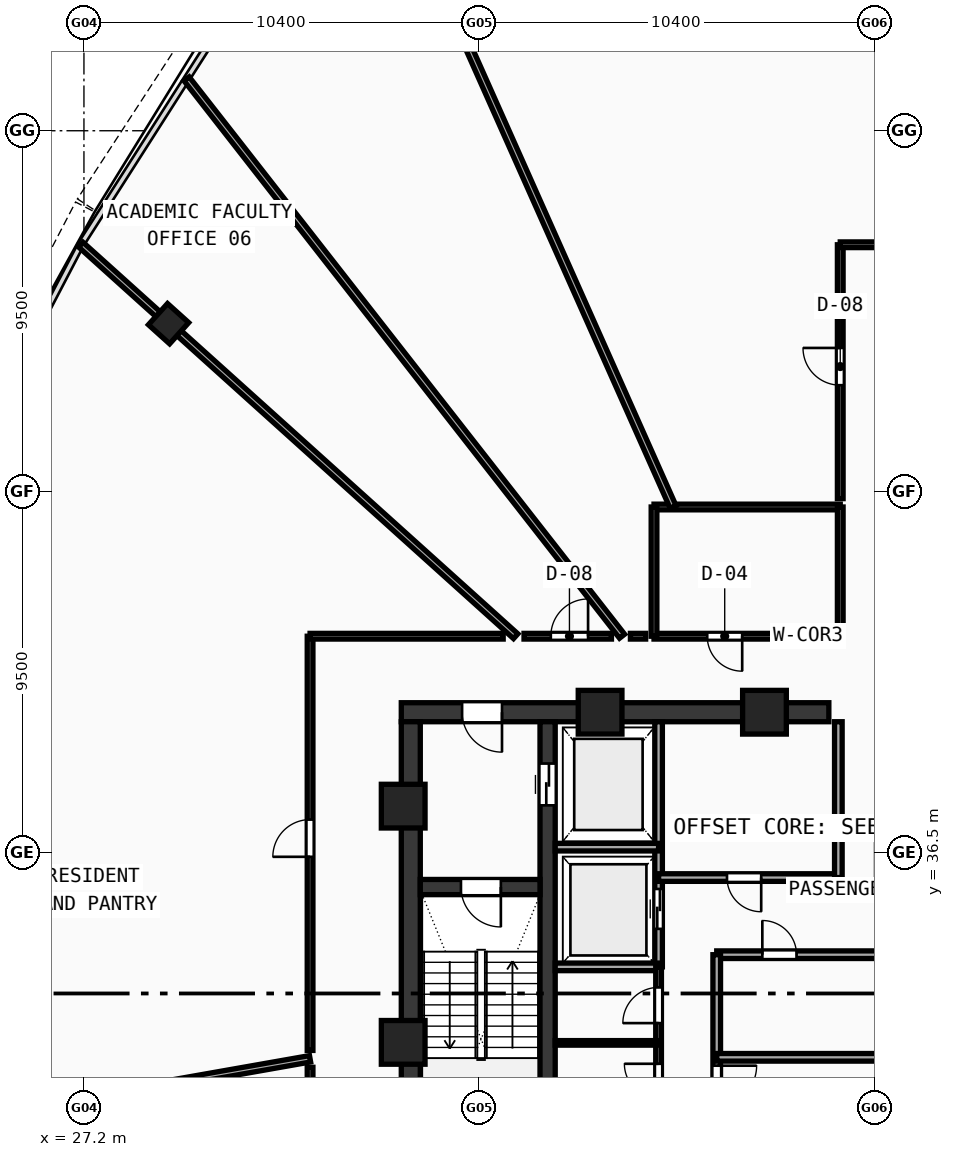
"""IFC4 building model, lengths in metres.
Left out: names, types, materials, properties, quantities, classifications, styles, units other than length and angle.
Written with IfcOpenShell. Run it as: python <this file> out.ifc"""

import sys

from ifc_helpers import new_model, si_unit, direction, frame, frame_2d, origin, origin_with_axes, origin_2d, place, context, subcontext, project, spatial, rectangle, hollow_rectangle, extrude, source, transform, mapped, element, fill, save


model = new_model("IFC4")
c1 = context("Model", 3, precision=1e-05, world=origin(), true_north=direction((0.0, 1.0)))
c2 = subcontext(c1, "Body", "Model", "MODEL_VIEW")
j1 = project(units=[si_unit("LENGTHUNIT", "METRE"), si_unit("PLANEANGLEUNIT", "RADIAN")], contexts=[c1])
p1 = place(None, origin())
s1 = spatial("IfcSite", under=j1, at=p1, CompositionType="ELEMENT")
p2 = place(p1, origin())
s2 = spatial("IfcBuilding", under=s1, at=p2, CompositionType="ELEMENT")
p3 = place(p2, frame((0.0, 0.0, 277.56)))
s3 = spatial("IfcBuildingStorey", under=s2, at=p3, CompositionType="ELEMENT", Elevation=277.56)
p4 = place(p3, frame((35.55, 40.2, 0.0), z_axis=(0.0, 0.0, 1.0), x_axis=(1.0, 0.0, 0.0)))
e1 = element("IfcWall", 1, at=p4, inside=s3, PredefinedType="SHEAR", context=c2, shape_type="SweptSolid", body=[
    extrude(rectangle(XDim=11.25, YDim=0.5, at=frame_2d((5.625, 0.0))), origin(), (0.0, 0.0, 1.0), 3.47),
])
p5 = place(p4, frame((1.6, 0.0, 0.0)))
e2 = element("IfcOpeningElement", 2, at=p5, cuts=e1, PredefinedType="OPENING", context=c2, shape_type="SweptSolid", body=[
    extrude(rectangle(XDim=1.05, YDim=2.1, at=frame_2d((0.525, 1.05))), frame((0.0, 0.26, 0.0), z_axis=(0.0, -1.0, 0.0), x_axis=(1.0, 0.0, 0.0)), (0.0, 0.0, 1.0), 0.52),
])
p6 = place(p3, frame((35.8, 27.75, 0.0), z_axis=(0.0, 0.0, 1.0), x_axis=(0.0, 1.0, 0.0)))
e3 = element("IfcWall", 3, at=p6, inside=s3, PredefinedType="SHEAR", context=c2, shape_type="SweptSolid", body=[
    extrude(rectangle(XDim=12.2, YDim=0.5, at=frame_2d((6.1, 0.0))), origin(), (0.0, 0.0, 1.0), 3.47),
])
p7 = place(p3, frame((39.4, 27.75, 0.0), z_axis=(0.0, 0.0, 1.0), x_axis=(0.0, 1.0, 0.0)))
e4 = element("IfcWall", 4, at=p7, inside=s3, PredefinedType="SHEAR", context=c2, shape_type="SweptSolid", body=[
    extrude(rectangle(XDim=12.2, YDim=0.4, at=frame_2d((6.1, 0.0))), origin(), (0.0, 0.0, 1.0), 3.47),
])
p8 = place(p7, frame((10.0, 0.0, 0.0)))
e5 = element("IfcOpeningElement", 5, at=p8, cuts=e4, PredefinedType="OPENING", context=c2, shape_type="SweptSolid", body=[
    extrude(rectangle(XDim=1.1, YDim=2.1, at=frame_2d((0.55, 1.05))), frame((0.0, 0.21, 0.0), z_axis=(0.0, -1.0, 0.0), x_axis=(1.0, 0.0, 0.0)), (0.0, 0.0, 1.0), 0.42),
])
p9 = place(p3, frame((36.05, 35.6, 0.0), z_axis=(0.0, 0.0, 1.0), x_axis=(1.0, 0.0, 0.0)))
e6 = element("IfcWall", 6, at=p9, inside=s3, PredefinedType="SHEAR", context=c2, shape_type="SweptSolid", body=[
    extrude(rectangle(XDim=3.15, YDim=0.4, at=frame_2d((1.575, 0.0))), origin(), (0.0, 0.0, 1.0), 3.47),
])
p10 = place(p9, frame((1.07, 0.0, 0.0)))
e7 = element("IfcOpeningElement", 7, at=p10, cuts=e6, PredefinedType="OPENING", context=c2, shape_type="SweptSolid", body=[
    extrude(rectangle(XDim=1.05, YDim=2.1, at=frame_2d((0.525, 1.05))), frame((0.0, 0.21, 0.0), z_axis=(0.0, -1.0, 0.0), x_axis=(1.0, 0.0, 0.0)), (0.0, 0.0, 1.0), 0.42),
])
m1 = source(origin(), c2, "Body", "SweptSolid", [
    extrude(hollow_rectangle(XDim=1.15, YDim=1.15, WallThickness=0.048, at=origin_2d()), origin(), (0.0, 0.0, 1.0), 3.73),
])
for number, where, z_axis, x_axis in (
    (8, (45.106, 40.2, -0.26), (0.0, 0.0, 1.0), (1.0, 0.0, 0.0)),
    (9, (40.781, 40.2, -0.26), (0.0, 0.0, 1.0), (1.0, 0.0, 0.0)),
    (10, (35.6, 37.729, -0.26), (0.0, 0.0, 1.0), (1.0, 0.0, 0.0)),
    (11, (35.6, 31.513, -0.26), (0.0, 0.0, 1.0), (1.0, 0.0, 0.0)),
):
    element("IfcColumn", number, at=place(p3, frame(where, z_axis=z_axis, x_axis=x_axis)), inside=s3, PredefinedType="COLUMN", context=c2, shape_type="MappedRepresentation", body=[
        mapped(m1, transform((0.0, 0.0, 0.0), scale=1.0)),
    ])
m2 = source(origin(), c2, "Body", "SweptSolid", [
    extrude(hollow_rectangle(XDim=0.75, YDim=0.75, WallThickness=0.028, at=origin_2d()), origin(), (0.0, 0.0, 1.0), 3.73),
])
p11 = place(p3, frame((29.427, 50.424, -0.26), z_axis=(0.0, 0.0, 1.0), x_axis=(-0.669130606359, -0.743144825477, 0.0)))
e12 = element("IfcColumn", 12, at=p11, inside=s3, PredefinedType="COLUMN", context=c2, shape_type="MappedRepresentation", body=[
    mapped(m2, transform((0.0, 0.0, 0.0), scale=1.0)),
])
p12 = place(p3, frame((42.32, 33.5, 0.0), z_axis=(0.0, 0.0, 1.0), x_axis=(0.0, 1.0, 0.0)))
e13 = element("IfcWall", 13, at=p12, inside=s3, PredefinedType="SOLIDWALL", context=c2, shape_type="SweptSolid", body=[
    extrude(rectangle(XDim=6.45, YDim=0.2, at=frame_2d((3.225, 0.0))), origin(), (0.0, 0.0, 1.0), 3.47),
])
p13 = place(p12, frame((1.0, 0.0, 0.0)))
e14 = element("IfcOpeningElement", 14, at=p13, cuts=e13, PredefinedType="OPENING", context=c2, shape_type="SweptSolid", body=[
    extrude(rectangle(XDim=1.05, YDim=2.1, at=frame_2d((0.525, 1.05))), frame((0.0, 0.11, 0.0), z_axis=(0.0, -1.0, 0.0), x_axis=(1.0, 0.0, 0.0)), (0.0, 0.0, 1.0), 0.22),
])
for number, where, z_axis, x_axis in (
    (15, (39.6, 36.65, 0.0), (0.0, 0.0, 1.0), (1.0, 0.0, 0.0)),
    (16, (39.6, 33.5, 0.0), (0.0, 0.0, 1.0), (1.0, 0.0, 0.0)),
):
    element("IfcWall", number, at=place(p3, frame(where, z_axis=z_axis, x_axis=x_axis)), inside=s3, PredefinedType="SOLIDWALL", context=c2, shape_type="SweptSolid", body=[
        extrude(rectangle(XDim=2.72, YDim=0.2, at=frame_2d((1.36, 0.0))), origin(), (0.0, 0.0, 1.0), 3.47),
    ])
p14 = place(p3, frame((42.32, 35.85, 0.0), z_axis=(0.0, 0.0, 1.0), x_axis=(1.0, 0.0, 0.0)))
e17 = element("IfcWall", 17, at=p14, inside=s3, PredefinedType="SOLIDWALL", context=c2, shape_type="SweptSolid", body=[
    extrude(rectangle(XDim=4.73, YDim=0.2, at=frame_2d((2.365, 0.0))), origin(), (0.0, 0.0, 1.0), 3.47),
])
p15 = place(p14, frame((1.8, 0.0, 0.0)))
e18 = element("IfcOpeningElement", 18, at=p15, cuts=e17, PredefinedType="OPENING", context=c2, shape_type="SweptSolid", body=[
    extrude(rectangle(XDim=0.9, YDim=2.1, at=frame_2d((0.45, 1.05))), frame((0.0, 0.11, 0.0), z_axis=(0.0, -1.0, 0.0), x_axis=(1.0, 0.0, 0.0)), (0.0, 0.0, 1.0), 0.22),
])
p16 = place(p3, frame((47.05, 35.85, 0.0), z_axis=(0.0, 0.0, 1.0), x_axis=(0.0, 1.0, 0.0)))
e19 = element("IfcWall", 19, at=p16, inside=s3, PredefinedType="SOLIDWALL", context=c2, shape_type="SweptSolid", body=[
    extrude(rectangle(XDim=4.1, YDim=0.2, at=frame_2d((2.05, 0.0))), origin(), (0.0, 0.0, 1.0), 3.47),
])
p17 = place(p3, frame((43.85, 33.82, 0.0), z_axis=(0.0, 0.0, 1.0), x_axis=(1.0, 0.0, 0.0)))
e20 = element("IfcWall", 20, at=p17, inside=s3, PredefinedType="SOLIDWALL", context=c2, shape_type="SweptSolid", body=[
    extrude(rectangle(XDim=9.83, YDim=0.2, at=frame_2d((4.915, 0.0))), origin(), (0.0, 0.0, 1.0), 3.47),
])
p18 = place(p17, frame((1.2, 0.0, 0.0)))
e21 = element("IfcOpeningElement", 21, at=p18, cuts=e20, PredefinedType="OPENING", context=c2, shape_type="SweptSolid", body=[
    extrude(rectangle(XDim=0.9, YDim=2.1, at=frame_2d((0.45, 1.05))), frame((0.0, 0.11, 0.0), z_axis=(0.0, -1.0, 0.0), x_axis=(1.0, 0.0, 0.0)), (0.0, 0.0, 1.0), 0.22),
])
p19 = place(p17, frame((7.2, 0.0, 0.0)))
e22 = element("IfcOpeningElement", 22, at=p19, cuts=e20, PredefinedType="OPENING", context=c2, shape_type="SweptSolid", body=[
    extrude(rectangle(XDim=0.9, YDim=2.1, at=frame_2d((0.45, 1.05))), frame((0.0, 0.11, 0.0), z_axis=(0.0, -1.0, 0.0), x_axis=(1.0, 0.0, 0.0)), (0.0, 0.0, 1.0), 0.22),
])
p20 = place(p3, frame((43.85, 27.6, 0.0), z_axis=(0.0, 0.0, 1.0), x_axis=(0.0, 1.0, 0.0)))
e23 = element("IfcWall", 23, at=p20, inside=s3, PredefinedType="SOLIDWALL", context=c2, shape_type="SweptSolid", body=[
    extrude(rectangle(XDim=6.22, YDim=0.2, at=frame_2d((3.11, 0.0))), origin(), (0.0, 0.0, 1.0), 3.47),
])
p21 = place(p20, frame((2.25, 0.0, 0.0)))
e24 = element("IfcOpeningElement", 24, at=p21, cuts=e23, PredefinedType="OPENING", context=c2, shape_type="SweptSolid", body=[
    extrude(rectangle(XDim=1.05, YDim=2.1, at=frame_2d((0.525, 1.05))), frame((0.0, 0.11, 0.0), z_axis=(0.0, -1.0, 0.0), x_axis=(1.0, 0.0, 0.0)), (0.0, 0.0, 1.0), 0.22),
])
p22 = place(p3, frame((43.85, 31.12, 0.0), z_axis=(0.0, 0.0, 1.0), x_axis=(1.0, 0.0, 0.0)))
e25 = element("IfcWall", 25, at=p22, inside=s3, PredefinedType="SOLIDWALL", context=c2, shape_type="SweptSolid", body=[
    extrude(rectangle(XDim=9.83, YDim=0.2, at=frame_2d((4.915, 0.0))), origin(), (0.0, 0.0, 1.0), 3.47),
])
p23 = place(p3, frame((42.32, 27.6, 0.0), z_axis=(0.0, 0.0, 1.0), x_axis=(0.0, 1.0, 0.0)))
e26 = element("IfcWall", 26, at=p23, inside=s3, PredefinedType="PARTITIONING", context=c2, shape_type="SweptSolid", body=[
    extrude(rectangle(XDim=5.9, YDim=0.15, at=frame_2d((2.95, 0.0))), origin(), (0.0, 0.0, 1.0), 3.47),
])
p24 = place(p23, frame((0.5, 0.0, 0.0)))
e27 = element("IfcOpeningElement", 27, at=p24, cuts=e26, PredefinedType="OPENING", context=c2, shape_type="SweptSolid", body=[
    extrude(rectangle(XDim=0.9, YDim=2.1, at=frame_2d((0.45, 1.05))), frame((0.0, 0.085, 0.0), z_axis=(0.0, -1.0, 0.0), x_axis=(1.0, 0.0, 0.0)), (0.0, 0.0, 1.0), 0.17),
])
p25 = place(p23, frame((2.45, 0.0, 0.0)))
e28 = element("IfcOpeningElement", 28, at=p25, cuts=e26, PredefinedType="OPENING", context=c2, shape_type="SweptSolid", body=[
    extrude(rectangle(XDim=0.9, YDim=2.1, at=frame_2d((0.45, 1.05))), frame((0.0, 0.085, 0.0), z_axis=(0.0, -1.0, 0.0), x_axis=(1.0, 0.0, 0.0)), (0.0, 0.0, 1.0), 0.17),
])
p26 = place(p23, frame((4.42, 0.0, 0.0)))
e29 = element("IfcOpeningElement", 29, at=p26, cuts=e26, PredefinedType="OPENING", context=c2, shape_type="SweptSolid", body=[
    extrude(rectangle(XDim=0.94, YDim=2.1, at=frame_2d((0.47, 1.05))), frame((0.0, 0.085, 0.0), z_axis=(0.0, -1.0, 0.0), x_axis=(1.0, 0.0, 0.0)), (0.0, 0.0, 1.0), 0.17),
])
p27 = place(p3, frame((39.6, 31.5, 0.0), z_axis=(0.0, 0.0, 1.0), x_axis=(1.0, 0.0, 0.0)))
e30 = element("IfcWall", 30, at=p27, inside=s3, PredefinedType="PARTITIONING", context=c2, shape_type="SweptSolid", body=[
    extrude(rectangle(XDim=2.72, YDim=0.12, at=frame_2d((1.36, 0.0))), origin(), (0.0, 0.0, 1.0), 3.47),
])
p28 = place(p3, frame((42.2, 42.2, 0.0), z_axis=(0.0, 0.0, 1.0), x_axis=(1.0, 0.0, 0.0)))
e31 = element("IfcWall", 31, at=p28, inside=s3, PredefinedType="PARTITIONING", context=c2, shape_type="SweptSolid", body=[
    extrude(rectangle(XDim=4.9, YDim=0.15, at=frame_2d((2.45, 0.0))), origin(), (0.0, 0.0, 1.0), 2.87),
])
p29 = place(p28, frame((1.4, 0.0, 0.0)))
e32 = element("IfcOpeningElement", 32, at=p29, cuts=e31, PredefinedType="OPENING", context=c2, shape_type="SweptSolid", body=[
    extrude(rectangle(XDim=0.92, YDim=2.1, at=frame_2d((0.46, 1.05))), frame((0.0, 0.085, 0.0), z_axis=(0.0, -1.0, 0.0), x_axis=(1.0, 0.0, 0.0)), (0.0, 0.0, 1.0), 0.17),
])
p30 = place(p3, frame((42.2, 45.6, 0.0), z_axis=(0.0, 0.0, 1.0), x_axis=(1.0, 0.0, 0.0)))
e33 = element("IfcWall", 33, at=p30, inside=s3, PredefinedType="PARTITIONING", context=c2, shape_type="SweptSolid", body=[
    extrude(rectangle(XDim=4.9, YDim=0.15, at=frame_2d((2.45, 0.0))), origin(), (0.0, 0.0, 1.0), 2.87),
])
for number, where, z_axis, x_axis in (
    (34, (42.2, 42.2, 0.0), (0.0, 0.0, 1.0), (0.0, 1.0, 0.0)),
    (35, (47.1, 42.2, 0.0), (0.0, 0.0, 1.0), (0.0, 1.0, 0.0)),
):
    element("IfcWall", number, at=place(p3, frame(where, z_axis=z_axis, x_axis=x_axis)), inside=s3, PredefinedType="PARTITIONING", context=c2, shape_type="SweptSolid", body=[
        extrude(rectangle(XDim=3.4, YDim=0.15, at=frame_2d((1.7, 0.0))), origin(), (0.0, 0.0, 1.0), 3.47),
    ])
p31 = place(p3, frame((42.702, 45.6, 0.0), z_axis=(0.0, 0.0, 1.0), x_axis=(-0.406743072482, 0.91354259506, 0.0)))
e36 = element("IfcWall", 36, at=p31, inside=s3, PredefinedType="PARTITIONING", context=c2, shape_type="SweptSolid", body=[
    extrude(rectangle(XDim=20.191, YDim=0.17, at=frame_2d((10.096, 0.0))), origin(), (0.0, 0.0, 1.0), 2.87),
])
p32 = place(p3, frame((41.359, 42.2, 0.0), z_axis=(0.0, 0.0, 1.0), x_axis=(-0.615658553978, 0.788013036005, 0.0)))
e37 = element("IfcWall", 37, at=p32, inside=s3, PredefinedType="PARTITIONING", context=c2, shape_type="SweptSolid", body=[
    extrude(rectangle(XDim=18.609, YDim=0.17, at=frame_2d((9.304, 0.0))), origin(), (0.0, 0.0, 1.0), 2.87),
])
p33 = place(p3, frame((38.56, 42.2, 0.0), z_axis=(0.0, 0.0, 1.0), x_axis=(-0.743145118403, 0.669130281032, 0.0)))
e38 = element("IfcWall", 38, at=p33, inside=s3, PredefinedType="PARTITIONING", context=c2, shape_type="SweptSolid", body=[
    extrude(rectangle(XDim=15.397, YDim=0.17, at=frame_2d((7.699, 0.0))), origin(), (0.0, 0.0, 1.0), 2.87),
])
p34 = place(p3, frame((33.15, 31.082, 0.0), z_axis=(0.0, 0.0, 1.0), x_axis=(-0.984807054696, -0.173652137966, 0.0)))
e39 = element("IfcWall", 39, at=p34, inside=s3, PredefinedType="PARTITIONING", context=c2, shape_type="SweptSolid", body=[
    extrude(rectangle(XDim=17.567, YDim=0.17, at=frame_2d((8.783, 0.0))), origin(), (0.0, 0.0, 1.0), 2.87),
])
p35 = place(p3, frame((33.15, 24.9, 0.0), z_axis=(0.0, 0.0, 1.0), x_axis=(0.0, 1.0, 0.0)))
e40 = element("IfcWall", 40, at=p35, inside=s3, PredefinedType="PARTITIONING", context=c2, shape_type="SweptSolid", body=[
    extrude(rectangle(XDim=5.958, YDim=0.15, at=frame_2d((2.979, 0.0))), origin(), (0.0, 0.0, 1.0), 3.12),
])
p36 = place(p3, frame((33.15, 31.301, 0.0), z_axis=(0.0, 0.0, 1.0), x_axis=(0.0, 1.0, 0.0)))
e41 = element("IfcWall", 41, at=p36, inside=s3, PredefinedType="PARTITIONING", context=c2, shape_type="SweptSolid", body=[
    extrude(rectangle(XDim=10.899, YDim=0.15, at=frame_2d((5.449, 0.0))), origin(), (0.0, 0.0, 1.0), 2.87),
])
p37 = place(p36, frame((5.094, 0.0, 0.0)))
e42 = element("IfcOpeningElement", 42, at=p37, cuts=e41, PredefinedType="OPENING", context=c2, shape_type="SweptSolid", body=[
    extrude(rectangle(XDim=0.98, YDim=2.12, at=frame_2d((0.49, 1.06))), frame((0.0, 0.085, 0.0), z_axis=(0.0, -1.0, 0.0), x_axis=(1.0, 0.0, 0.0)), (0.0, 0.0, 1.0), 0.17),
])
p38 = place(p3, frame((33.15, 42.2, 0.0), z_axis=(0.0, 0.0, 1.0), x_axis=(1.0, 0.0, 0.0)))
e43 = element("IfcWall", 43, at=p38, inside=s3, PredefinedType="PARTITIONING", context=c2, shape_type="SweptSolid", body=[
    extrude(rectangle(XDim=5.081, YDim=0.15, at=frame_2d((2.541, 0.0))), origin(), (0.0, 0.0, 1.0), 3.12),
])
p39 = place(p3, frame((38.78, 42.2, 0.0), z_axis=(0.0, 0.0, 1.0), x_axis=(1.0, 0.0, 0.0)))
e44 = element("IfcWall", 44, at=p39, inside=s3, PredefinedType="PARTITIONING", context=c2, shape_type="SweptSolid", body=[
    extrude(rectangle(XDim=2.3, YDim=0.15, at=frame_2d((1.15, 0.0))), origin(), (0.0, 0.0, 1.0), 2.87),
])
p40 = place(p39, frame((0.705, 0.0, 0.0)))
e45 = element("IfcOpeningElement", 45, at=p40, cuts=e44, PredefinedType="OPENING", context=c2, shape_type="SweptSolid", body=[
    extrude(rectangle(XDim=0.98, YDim=2.12, at=frame_2d((0.49, 1.06))), frame((0.0, 0.085, 0.0), z_axis=(0.0, -1.0, 0.0), x_axis=(1.0, 0.0, 0.0)), (0.0, 0.0, 1.0), 0.17),
])
p41 = place(p3, frame((41.579, 42.2, 0.0), z_axis=(0.0, 0.0, 1.0), x_axis=(1.0, 0.0, 0.0)))
e46 = element("IfcWall", 46, at=p41, inside=s3, PredefinedType="PARTITIONING", context=c2, shape_type="SweptSolid", body=[
    extrude(rectangle(XDim=0.401, YDim=0.15, at=frame_2d((0.201, 0.0))), origin(), (0.0, 0.0, 1.0), 3.47),
])
p42 = place(p3, frame((47.1, 45.82, 0.0), z_axis=(0.0, 0.0, 1.0), x_axis=(0.0, 1.0, 0.0)))
e47 = element("IfcWall", 47, at=p42, inside=s3, PredefinedType="PARTITIONING", context=c2, shape_type="SweptSolid", body=[
    extrude(rectangle(XDim=6.68, YDim=0.15, at=frame_2d((3.34, 0.0))), origin(), (0.0, 0.0, 1.0), 3.12),
])
p43 = place(p42, frame((2.985, 0.0, 0.0)))
e48 = element("IfcOpeningElement", 48, at=p43, cuts=e47, PredefinedType="OPENING", context=c2, shape_type="SweptSolid", body=[
    extrude(rectangle(XDim=0.98, YDim=2.12, at=frame_2d((0.49, 1.06))), frame((0.0, 0.085, 0.0), z_axis=(0.0, -1.0, 0.0), x_axis=(1.0, 0.0, 0.0)), (0.0, 0.0, 1.0), 0.17),
])
p44 = place(p3, frame((47.1, 52.5, 0.0), z_axis=(0.0, 0.0, 1.0), x_axis=(1.0, 0.0, 0.0)))
e49 = element("IfcWall", 49, at=p44, inside=s3, PredefinedType="PARTITIONING", context=c2, shape_type="SweptSolid", body=[
    extrude(rectangle(XDim=1.8, YDim=0.15, at=frame_2d((0.9, 0.0))), origin(), (0.0, 0.0, 1.0), 3.47),
])
m3 = source(origin(), c2, "Body", "SweptSolid", [
    extrude(rectangle(XDim=1.05, YDim=2.1, at=frame_2d((0.525, 1.05))), frame((0.0, 0.025, 0.0), z_axis=(0.0, -1.0, 0.0), x_axis=(1.0, 0.0, 0.0)), (0.0, 0.0, 1.0), 0.05),
])
p45 = place(p10, frame((1.05, 0.0, 0.0), z_axis=(0.0, 0.0, 1.0), x_axis=(-1.0, 0.0, 0.0)))
e50 = element("IfcDoor", 50, at=p45, inside=s3, OperationType="SINGLE_SWING_LEFT", PredefinedType="DOOR", context=c2, shape_type="MappedRepresentation", body=[
    mapped(m3, transform((0.0, 0.0, 0.0), scale=1.0)),
])
fill(e7, e50)
p46 = place(p5, frame((1.05, 0.0, 0.0), z_axis=(0.0, 0.0, 1.0), x_axis=(-1.0, 0.0, 0.0)))
e51 = element("IfcDoor", 51, at=p46, inside=s3, OperationType="SINGLE_SWING_LEFT", PredefinedType="DOOR", context=c2, shape_type="MappedRepresentation", body=[
    mapped(m3, transform((0.0, 0.0, 0.0), scale=1.0)),
])
fill(e2, e51)
m4 = source(origin(), c2, "Body", "SweptSolid", [
    extrude(rectangle(XDim=1.1, YDim=2.1, at=frame_2d((0.55, 1.05))), frame((0.0, 0.025, 0.0), z_axis=(0.0, -1.0, 0.0), x_axis=(1.0, 0.0, 0.0)), (0.0, 0.0, 1.0), 0.05),
])
p47 = place(p8, frame((1.1, 0.0, 0.0), z_axis=(0.0, 0.0, 1.0), x_axis=(-1.0, 0.0, 0.0)))
e52 = element("IfcDoor", 52, at=p47, inside=s3, OperationType="DOUBLE_DOOR_SLIDING", PredefinedType="DOOR", context=c2, shape_type="MappedRepresentation", body=[
    mapped(m4, transform((0.0, 0.0, 0.0), scale=1.0)),
])
fill(e5, e52)
p48 = place(p13, origin_with_axes())
e53 = element("IfcDoor", 53, at=p48, inside=s3, OperationType="DOUBLE_DOOR_SLIDING", PredefinedType="DOOR", context=c2, shape_type="MappedRepresentation", body=[
    mapped(m3, transform((0.0, 0.0, 0.0), scale=1.0)),
])
fill(e14, e53)
m5 = source(origin(), c2, "Body", "SweptSolid", [
    extrude(rectangle(XDim=0.9, YDim=2.1, at=frame_2d((0.45, 1.05))), frame((0.0, 0.025, 0.0), z_axis=(0.0, -1.0, 0.0), x_axis=(1.0, 0.0, 0.0)), (0.0, 0.0, 1.0), 0.05),
])
p49 = place(p15, frame((0.9, 0.0, 0.0), z_axis=(0.0, 0.0, 1.0), x_axis=(-1.0, 0.0, 0.0)))
e54 = element("IfcDoor", 54, at=p49, inside=s3, OperationType="SINGLE_SWING_LEFT", PredefinedType="DOOR", context=c2, shape_type="MappedRepresentation", body=[
    mapped(m5, transform((0.0, 0.0, 0.0), scale=1.0)),
])
fill(e18, e54)
p50 = place(p18, origin_with_axes())
e55 = element("IfcDoor", 55, at=p50, inside=s3, OperationType="SINGLE_SWING_LEFT", PredefinedType="DOOR", context=c2, shape_type="MappedRepresentation", body=[
    mapped(m5, transform((0.0, 0.0, 0.0), scale=1.0)),
])
fill(e21, e55)
p51 = place(p21, frame((1.05, 0.0, 0.0), z_axis=(0.0, 0.0, 1.0), x_axis=(-1.0, 0.0, 0.0)))
e56 = element("IfcDoor", 56, at=p51, inside=s3, OperationType="SINGLE_SWING_LEFT", PredefinedType="DOOR", context=c2, shape_type="MappedRepresentation", body=[
    mapped(m3, transform((0.0, 0.0, 0.0), scale=1.0)),
])
fill(e24, e56)
p52 = place(p25, origin_with_axes())
e57 = element("IfcDoor", 57, at=p52, inside=s3, OperationType="SINGLE_SWING_RIGHT", PredefinedType="DOOR", context=c2, shape_type="MappedRepresentation", body=[
    mapped(m5, transform((0.0, 0.0, 0.0), scale=1.0)),
])
fill(e28, e57)
m6 = source(origin(), c2, "Body", "SweptSolid", [
    extrude(rectangle(XDim=0.94, YDim=2.1, at=frame_2d((0.47, 1.05))), frame((0.0, 0.025, 0.0), z_axis=(0.0, -1.0, 0.0), x_axis=(1.0, 0.0, 0.0)), (0.0, 0.0, 1.0), 0.05),
])
p53 = place(p26, origin_with_axes())
e58 = element("IfcDoor", 58, at=p53, inside=s3, OperationType="SINGLE_SWING_LEFT", PredefinedType="DOOR", context=c2, shape_type="MappedRepresentation", body=[
    mapped(m6, transform((0.0, 0.0, 0.0), scale=1.0)),
])
fill(e29, e58)
m7 = source(origin(), c2, "Body", "SweptSolid", [
    extrude(rectangle(XDim=0.92, YDim=2.1, at=frame_2d((0.46, 1.05))), frame((0.0, 0.025, 0.0), z_axis=(0.0, -1.0, 0.0), x_axis=(1.0, 0.0, 0.0)), (0.0, 0.0, 1.0), 0.05),
])
p54 = place(p29, frame((0.92, 0.0, 0.0), z_axis=(0.0, 0.0, 1.0), x_axis=(-1.0, 0.0, 0.0)))
e59 = element("IfcDoor", 59, at=p54, inside=s3, OperationType="SINGLE_SWING_LEFT", PredefinedType="DOOR", context=c2, shape_type="MappedRepresentation", body=[
    mapped(m7, transform((0.0, 0.0, 0.0), scale=1.0)),
])
fill(e32, e59)
m8 = source(origin(), c2, "Body", "SweptSolid", [
    extrude(rectangle(XDim=0.98, YDim=2.12, at=frame_2d((0.49, 1.06))), frame((0.0, 0.025, 0.0), z_axis=(0.0, -1.0, 0.0), x_axis=(1.0, 0.0, 0.0)), (0.0, 0.0, 1.0), 0.05),
])
p55 = place(p43, origin_with_axes())
e60 = element("IfcDoor", 60, at=p55, inside=s3, OperationType="SINGLE_SWING_RIGHT", PredefinedType="DOOR", context=c2, shape_type="MappedRepresentation", body=[
    mapped(m8, transform((0.0, 0.0, 0.0), scale=1.0)),
])
fill(e48, e60)
p56 = place(p40, origin_with_axes())
e61 = element("IfcDoor", 61, at=p56, inside=s3, OperationType="SINGLE_SWING_RIGHT", PredefinedType="DOOR", context=c2, shape_type="MappedRepresentation", body=[
    mapped(m8, transform((0.0, 0.0, 0.0), scale=1.0)),
])
fill(e45, e61)
p57 = place(p37, origin_with_axes())
e62 = element("IfcDoor", 62, at=p57, inside=s3, OperationType="SINGLE_SWING_LEFT", PredefinedType="DOOR", context=c2, shape_type="MappedRepresentation", body=[
    mapped(m8, transform((0.0, 0.0, 0.0), scale=1.0)),
])
fill(e42, e62)
save(model, sys.argv[1])
